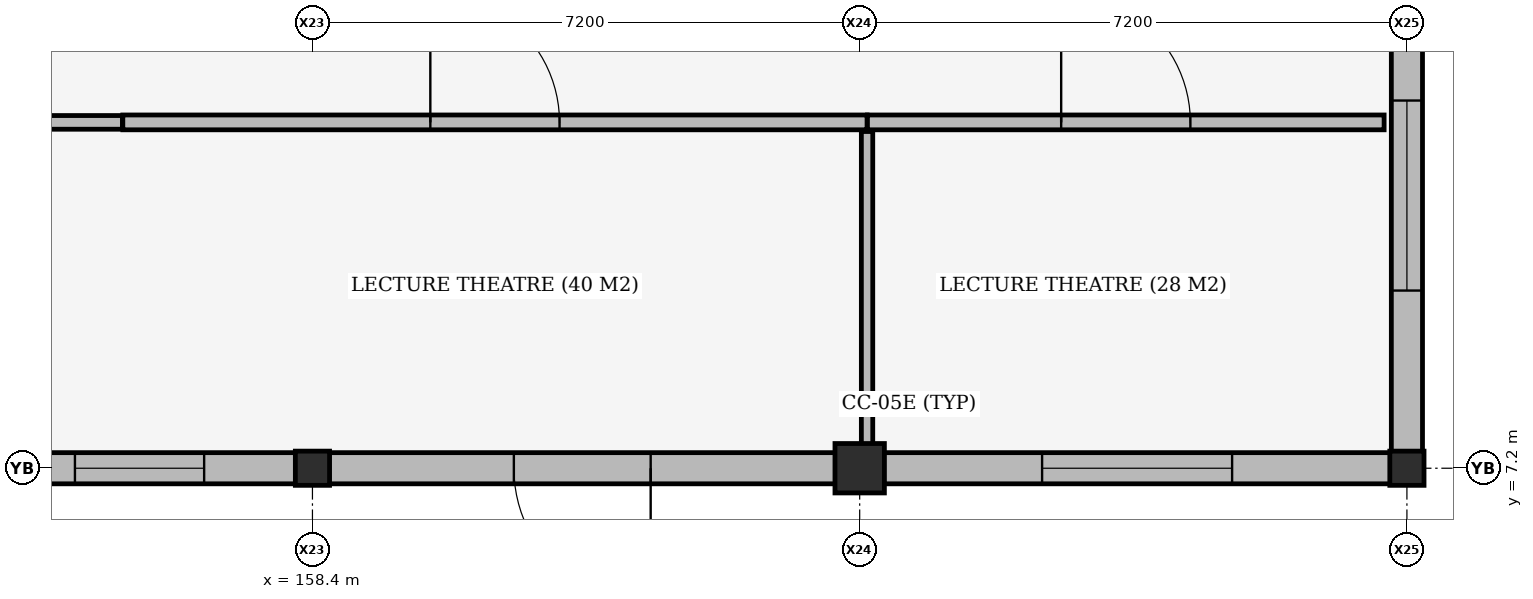
"""IFC4 building model, lengths in metres.
Left out: names, types, materials, properties, quantities, classifications, styles, units other than length and angle.
Written with IfcOpenShell. Run it as: python <this file> out.ifc"""

import sys

from ifc_helpers import new_model, si_unit, direction, frame, frame_2d, origin, origin_2d, place, context, subcontext, project, spatial, rectangle, extrude, element, fill, save


model = new_model("IFC4")
c1 = context("Model", 3, precision=1e-05, world=origin(), true_north=direction((0.0, 1.0)))
c2 = subcontext(c1, "Body", "Model", "MODEL_VIEW")
j1 = project(units=[si_unit("LENGTHUNIT", "METRE"), si_unit("PLANEANGLEUNIT", "RADIAN")], contexts=[c1])
p1 = place(None, origin())
s1 = spatial("IfcSite", under=j1, at=p1, CompositionType="ELEMENT")
p2 = place(p1, origin())
s2 = spatial("IfcBuilding", under=s1, at=p2, CompositionType="ELEMENT")
p3 = place(p2, origin())
s3 = spatial("IfcBuildingStorey", under=s2, at=p3, CompositionType="ELEMENT", Elevation=0.0)
p4 = place(p3, frame((158.4, 7.2, 0.0), z_axis=(0.0, 0.0, 1.0), x_axis=(1.0, 0.0, 0.0)))
e1 = element("IfcColumn", 1, at=p4, inside=s3, PredefinedType="COLUMN", context=c2, shape_type="SweptSolid", body=[
    extrude(rectangle(XDim=0.45, YDim=0.45, at=origin_2d()), origin(), (0.0, 0.0, 1.0), 5.1),
])
p5 = place(p3, frame((165.6, 7.2, 0.0), z_axis=(0.0, 0.0, 1.0), x_axis=(1.0, 0.0, 0.0)))
e2 = element("IfcColumn", 2, at=p5, inside=s3, PredefinedType="COLUMN", context=c2, shape_type="SweptSolid", body=[
    extrude(rectangle(XDim=0.65, YDim=0.65, at=origin_2d()), origin(), (0.0, 0.0, 1.0), 5.1),
])
p6 = place(p3, frame((172.8, 7.2, 0.0), z_axis=(0.0, 0.0, 1.0), x_axis=(1.0, 0.0, 0.0)))
e3 = element("IfcColumn", 3, at=p6, inside=s3, PredefinedType="COLUMN", context=c2, shape_type="SweptSolid", body=[
    extrude(rectangle(XDim=0.45, YDim=0.45, at=origin_2d()), origin(), (0.0, 0.0, 1.0), 5.1),
])
p7 = place(p3, frame((158.183, 7.2, 0.0), z_axis=(0.0, 0.0, 1.0), x_axis=(-1.0, 0.0, 0.0)))
e4 = element("IfcWall", 4, at=p7, inside=s3, PredefinedType="STANDARD", context=c2, shape_type="SweptSolid", body=[
    extrude(rectangle(XDim=6.616, YDim=0.41, at=frame_2d((3.308, 0.0))), origin(), (0.0, 0.0, 1.0), 4.4),
])
p8 = place(p7, frame((1.208, 0.0, 0.95)))
e5 = element("IfcOpeningElement", 5, at=p8, cuts=e4, PredefinedType="OPENING", context=c2, shape_type="SweptSolid", body=[
    extrude(rectangle(XDim=1.7, YDim=2.1, at=frame_2d((0.85, 1.05))), frame((0.0, 0.215, 0.0), z_axis=(0.0, -1.0, 0.0), x_axis=(1.0, 0.0, 0.0)), (0.0, 0.0, 1.0), 0.43),
])
p9 = place(p7, frame((3.708, 0.0, 0.95)))
e6 = element("IfcOpeningElement", 6, at=p9, cuts=e4, PredefinedType="OPENING", context=c2, shape_type="SweptSolid", body=[
    extrude(rectangle(XDim=1.7, YDim=2.1, at=frame_2d((0.85, 1.05))), frame((0.0, 0.215, 0.0), z_axis=(0.0, -1.0, 0.0), x_axis=(1.0, 0.0, 0.0)), (0.0, 0.0, 1.0), 0.43),
])
p10 = place(p3, frame((165.283, 7.2, 0.0), z_axis=(0.0, 0.0, 1.0), x_axis=(-1.0, 0.0, 0.0)))
e7 = element("IfcWall", 7, at=p10, inside=s3, PredefinedType="STANDARD", context=c2, shape_type="SweptSolid", body=[
    extrude(rectangle(XDim=6.666, YDim=0.41, at=frame_2d((3.333, 0.0))), origin(), (0.0, 0.0, 1.0), 4.4),
])
p11 = place(p10, frame((2.433, 0.0, 0.0)))
e8 = element("IfcOpeningElement", 8, at=p11, cuts=e7, PredefinedType="OPENING", context=c2, shape_type="SweptSolid", body=[
    extrude(rectangle(XDim=1.8, YDim=2.2, at=frame_2d((0.9, 1.1))), frame((0.0, 0.215, 0.0), z_axis=(0.0, -1.0, 0.0), x_axis=(1.0, 0.0, 0.0)), (0.0, 0.0, 1.0), 0.43),
])
p12 = place(p3, frame((172.583, 7.2, 0.0), z_axis=(0.0, 0.0, 1.0), x_axis=(-1.0, 0.0, 0.0)))
e9 = element("IfcWall", 9, at=p12, inside=s3, PredefinedType="STANDARD", context=c2, shape_type="SweptSolid", body=[
    extrude(rectangle(XDim=6.666, YDim=0.41, at=frame_2d((3.333, 0.0))), origin(), (0.0, 0.0, 1.0), 4.35),
])
p13 = place(p12, frame((2.083, 0.0, 0.85)))
e10 = element("IfcOpeningElement", 10, at=p13, cuts=e9, PredefinedType="OPENING", context=c2, shape_type="SweptSolid", body=[
    extrude(rectangle(XDim=2.5, YDim=2.8, at=frame_2d((1.25, 1.4))), frame((0.0, 0.215, 0.0), z_axis=(0.0, -1.0, 0.0), x_axis=(1.0, 0.0, 0.0)), (0.0, 0.0, 1.0), 0.43),
])
p14 = place(p3, frame((172.8, 14.158, 0.0), z_axis=(0.0, 0.0, 1.0), x_axis=(0.0, -1.0, 0.0)))
e11 = element("IfcWall", 11, at=p14, inside=s3, PredefinedType="STANDARD", context=c2, shape_type="SweptSolid", body=[
    extrude(rectangle(XDim=6.741, YDim=0.41, at=frame_2d((3.371, 0.0))), origin(), (0.0, 0.0, 1.0), 4.3),
])
p15 = place(p14, frame((2.121, 0.0, 0.85)))
e12 = element("IfcOpeningElement", 12, at=p15, cuts=e11, PredefinedType="OPENING", context=c2, shape_type="SweptSolid", body=[
    extrude(rectangle(XDim=2.5, YDim=2.8, at=frame_2d((1.25, 1.4))), frame((0.0, 0.215, 0.0), z_axis=(0.0, -1.0, 0.0), x_axis=(1.0, 0.0, 0.0)), (0.0, 0.0, 1.0), 0.43),
])
p16 = place(p3, frame((149.005, 11.75, 0.0), z_axis=(0.0, 0.0, 1.0), x_axis=(1.0, 0.0, 0.0)))
e13 = element("IfcWall", 13, at=p16, inside=s3, PredefinedType="PARTITIONING", context=c2, shape_type="SweptSolid", body=[
    extrude(rectangle(XDim=6.895, YDim=0.18, at=frame_2d((3.448, 0.0))), origin(), (0.0, 0.0, 1.0), 4.5),
])
p17 = place(p16, frame((2.958, 0.0, 0.0)))
e14 = element("IfcOpeningElement", 14, at=p17, cuts=e13, PredefinedType="OPENING", context=c2, shape_type="SweptSolid", body=[
    extrude(rectangle(XDim=0.98, YDim=2.18, at=frame_2d((0.49, 1.09))), frame((0.0, 0.1, 0.0), z_axis=(0.0, -1.0, 0.0), x_axis=(1.0, 0.0, 0.0)), (0.0, 0.0, 1.0), 0.2),
])
p18 = place(p3, frame((155.905, 11.75, 0.0), z_axis=(0.0, 0.0, 1.0), x_axis=(1.0, 0.0, 0.0)))
e15 = element("IfcWall", 15, at=p18, inside=s3, PredefinedType="PARTITIONING", context=c2, shape_type="SweptSolid", body=[
    extrude(rectangle(XDim=9.792, YDim=0.195, at=frame_2d((4.896, 0.0))), origin(), (0.0, 0.0, 1.0), 4.35),
])
p19 = place(p18, frame((4.046, 0.0, 0.0)))
e16 = element("IfcOpeningElement", 16, at=p19, cuts=e15, PredefinedType="OPENING", context=c2, shape_type="SweptSolid", body=[
    extrude(rectangle(XDim=1.7, YDim=2.25, at=frame_2d((0.85, 1.125))), frame((0.0, 0.107, 0.0), z_axis=(0.0, -1.0, 0.0), x_axis=(1.0, 0.0, 0.0)), (0.0, 0.0, 1.0), 0.215),
])
p20 = place(p3, frame((165.697, 7.45, 0.0), z_axis=(0.0, 0.0, 1.0), x_axis=(0.0, 1.0, 0.0)))
e17 = element("IfcWall", 17, at=p20, inside=s3, PredefinedType="PARTITIONING", context=c2, shape_type="SweptSolid", body=[
    extrude(rectangle(XDim=4.18, YDim=0.15, at=frame_2d((2.09, 0.0))), origin(), (0.0, 0.0, 1.0), 4.35),
])
p21 = place(p3, frame((165.702, 11.75, 0.0), z_axis=(0.0, 0.0, 1.0), x_axis=(1.0, 0.0, 0.0)))
e18 = element("IfcWall", 18, at=p21, inside=s3, PredefinedType="PARTITIONING", context=c2, shape_type="SweptSolid", body=[
    extrude(rectangle(XDim=6.798, YDim=0.195, at=frame_2d((3.399, 0.0))), origin(), (0.0, 0.0, 1.0), 4.35),
])
p22 = place(p21, frame((2.549, 0.0, 0.0)))
e19 = element("IfcOpeningElement", 19, at=p22, cuts=e18, PredefinedType="OPENING", context=c2, shape_type="SweptSolid", body=[
    extrude(rectangle(XDim=1.7, YDim=2.25, at=frame_2d((0.85, 1.125))), frame((0.0, 0.107, 0.0), z_axis=(0.0, -1.0, 0.0), x_axis=(1.0, 0.0, 0.0)), (0.0, 0.0, 1.0), 0.215),
])
p23 = place(p8, origin())
e20 = element("IfcWindow", 20, at=p23, inside=s3, PartitioningType="DOUBLE_PANEL_VERTICAL", PredefinedType="WINDOW", context=c2, shape_type="SweptSolid", body=[
    extrude(rectangle(XDim=1.7, YDim=2.1, at=frame_2d((0.85, 1.05))), frame((0.0, 0.03, 0.0), z_axis=(0.0, -1.0, 0.0), x_axis=(1.0, 0.0, 0.0)), (0.0, 0.0, 1.0), 0.06),
])
fill(e5, e20)
p24 = place(p11, origin())
e21 = element("IfcDoor", 21, at=p24, inside=s3, OperationType="DOUBLE_DOOR_SINGLE_SWING", PredefinedType="DOOR", context=c2, shape_type="SweptSolid", body=[
    extrude(rectangle(XDim=1.8, YDim=2.2, at=frame_2d((0.9, 1.1))), frame((0.0, 0.025, 0.0), z_axis=(0.0, -1.0, 0.0), x_axis=(1.0, 0.0, 0.0)), (0.0, 0.0, 1.0), 0.05),
])
fill(e8, e21)
p25 = place(p13, origin())
e22 = element("IfcWindow", 22, at=p25, inside=s3, PartitioningType="DOUBLE_PANEL_VERTICAL", PredefinedType="WINDOW", context=c2, shape_type="SweptSolid", body=[
    extrude(rectangle(XDim=2.5, YDim=2.8, at=frame_2d((1.25, 1.4))), frame((0.0, 0.03, 0.0), z_axis=(0.0, -1.0, 0.0), x_axis=(1.0, 0.0, 0.0)), (0.0, 0.0, 1.0), 0.06),
])
fill(e10, e22)
p26 = place(p15, origin())
e23 = element("IfcWindow", 23, at=p26, inside=s3, PartitioningType="DOUBLE_PANEL_VERTICAL", PredefinedType="WINDOW", context=c2, shape_type="SweptSolid", body=[
    extrude(rectangle(XDim=2.5, YDim=2.8, at=frame_2d((1.25, 1.4))), frame((0.0, 0.03, 0.0), z_axis=(0.0, -1.0, 0.0), x_axis=(1.0, 0.0, 0.0)), (0.0, 0.0, 1.0), 0.06),
])
fill(e12, e23)
p27 = place(p19, origin())
e24 = element("IfcDoor", 24, at=p27, inside=s3, OperationType="DOUBLE_DOOR_SINGLE_SWING", PredefinedType="DOOR", context=c2, shape_type="SweptSolid", body=[
    extrude(rectangle(XDim=1.7, YDim=2.25, at=frame_2d((0.85, 1.125))), frame((0.0, 0.025, 0.0), z_axis=(0.0, -1.0, 0.0), x_axis=(1.0, 0.0, 0.0)), (0.0, 0.0, 1.0), 0.05),
])
fill(e16, e24)
p28 = place(p22, origin())
e25 = element("IfcDoor", 25, at=p28, inside=s3, OperationType="DOUBLE_DOOR_SINGLE_SWING", PredefinedType="DOOR", context=c2, shape_type="SweptSolid", body=[
    extrude(rectangle(XDim=1.7, YDim=2.25, at=frame_2d((0.85, 1.125))), frame((0.0, 0.025, 0.0), z_axis=(0.0, -1.0, 0.0), x_axis=(1.0, 0.0, 0.0)), (0.0, 0.0, 1.0), 0.05),
])
fill(e19, e25)
save(model, sys.argv[1])
